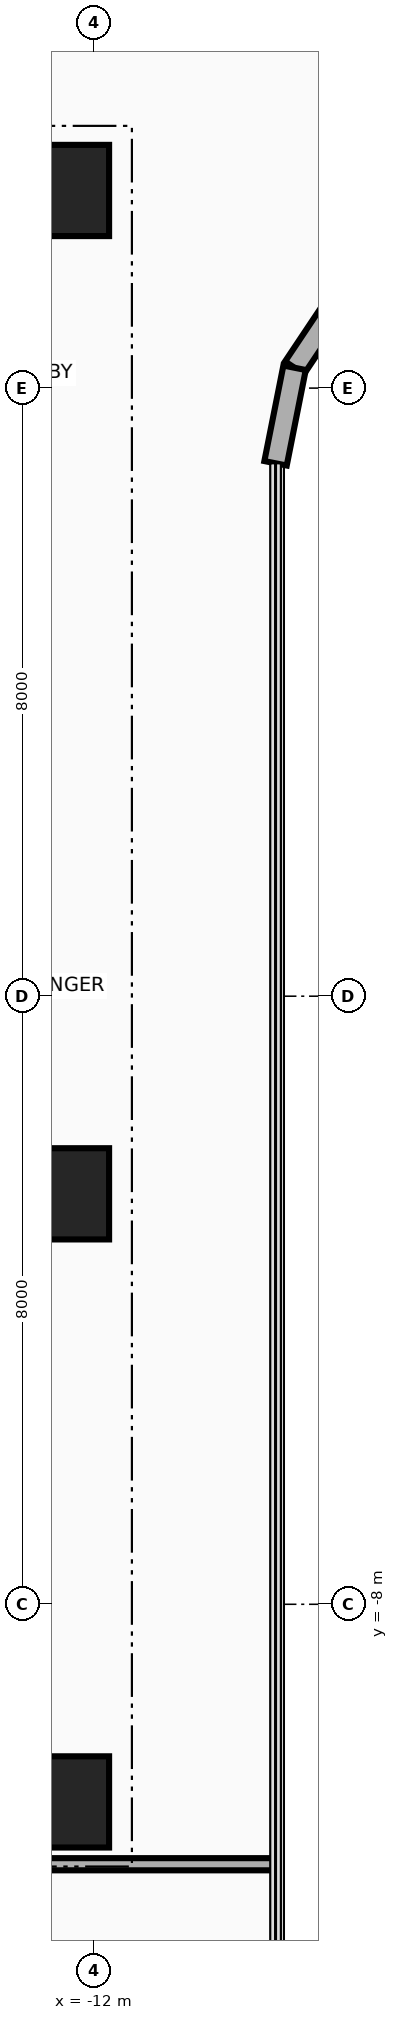
"""IFC4 building model, lengths in metres.
Left out: names, types, materials, properties, quantities, classifications, styles, units other than length and angle.
Written with IfcOpenShell. Run it as: python <this file> out.ifc"""

import sys

from ifc_helpers import new_model, si_unit, direction, frame, frame_2d, origin, origin_2d, place, context, subcontext, project, spatial, rectangle, extrude, source, transform, mapped, element, save


model = new_model("IFC4")
c1 = context("Model", 3, precision=1e-05, world=origin(), true_north=direction((0.0, 1.0)))
c2 = subcontext(c1, "Body", "Model", "MODEL_VIEW")
j1 = project(units=[si_unit("LENGTHUNIT", "METRE"), si_unit("PLANEANGLEUNIT", "RADIAN")], contexts=[c1])
p1 = place(None, origin())
s1 = spatial("IfcSite", under=j1, at=p1, CompositionType="ELEMENT")
p2 = place(p1, origin())
s2 = spatial("IfcBuilding", under=s1, at=p2, CompositionType="ELEMENT")
p3 = place(p2, frame((0.0, 0.0, 146.4)))
s3 = spatial("IfcBuildingStorey", under=s2, at=p3, CompositionType="ELEMENT", Elevation=146.4)
for number, where, z_axis, x_axis in (
    (1, (-22.65, 10.8, 0.0), (0.0, 0.0, 1.0), (1.0, 0.0, 0.0)),
    (2, (-22.65, -10.8, 0.0), (0.0, 0.0, 1.0), (1.0, 0.0, 0.0)),
):
    element("IfcWall", number, at=place(p3, frame(where, z_axis=z_axis, x_axis=x_axis)), inside=s3, PredefinedType="SHEAR", context=c2, shape_type="SweptSolid", body=[
        extrude(rectangle(XDim=10.25, YDim=0.7, at=frame_2d((5.125, 0.0))), origin(), (0.0, 0.0, 1.0), 3.46),
    ])
m1 = source(origin(), c2, "Body", "SweptSolid", [
    extrude(rectangle(XDim=1.2, YDim=1.2, at=origin_2d()), origin(), (0.0, 0.0, 1.0), 3.7),
])
for number, where, z_axis, x_axis in (
    (3, (-12.4, -10.6, 0.0), (0.0, 0.0, 1.0), (1.0, 0.0, 0.0)),
    (4, (-12.4, -2.6, 0.0), (0.0, 0.0, 1.0), (1.0, 0.0, 0.0)),
    (5, (-12.4, 10.6, 0.0), (0.0, 0.0, 1.0), (1.0, 0.0, 0.0)),
):
    element("IfcColumn", number, at=place(p3, frame(where, z_axis=z_axis, x_axis=x_axis)), inside=s3, PredefinedType="COLUMN", context=c2, shape_type="MappedRepresentation", body=[
        mapped(m1, transform((0.0, 0.0, 0.0), x_axis=(1.0, 0.0, 0.0), y_axis=(0.0, 1.0, 0.0), z_axis=(0.0, 0.0, 1.0), scale=1.0)),
    ])
p4 = place(p3, frame((-8.642, 9.342, 0.0), z_axis=(0.0, 0.0, 1.0), x_axis=(-0.555615398575, -0.831439431869, 0.0)))
e6 = element("IfcWall", 6, at=p4, inside=s3, PredefinedType="SOLIDWALL", context=c2, shape_type="SweptSolid", body=[
    extrude(rectangle(XDim=1.292, YDim=0.3, at=frame_2d((0.646, 0.0))), origin(), (0.0, 0.0, 1.0), 3.46),
])
p5 = place(p3, frame((-9.36, 8.268, 0.0), z_axis=(0.0, 0.0, 1.0), x_axis=(-0.195090163074, -0.980785312019, 0.0)))
e7 = element("IfcWall", 7, at=p5, inside=s3, PredefinedType="SOLIDWALL", context=c2, shape_type="SweptSolid", body=[
    extrude(rectangle(XDim=1.281, YDim=0.3, at=frame_2d((0.641, 0.0))), origin(), (0.0, 0.0, 1.0), 3.46),
])
p6 = place(p3, frame((-23.45, -11.42, 0.0), z_axis=(0.0, 0.0, 1.0), x_axis=(1.0, 0.0, 0.0)))
e8 = element("IfcWall", 8, at=p6, inside=s3, PredefinedType="PARTITIONING", context=c2, shape_type="SweptSolid", body=[
    extrude(rectangle(XDim=13.84, YDim=0.16, at=frame_2d((6.92, 0.0))), origin(), (0.0, 0.0, 1.0), 2.834),
])
save(model, sys.argv[1])
